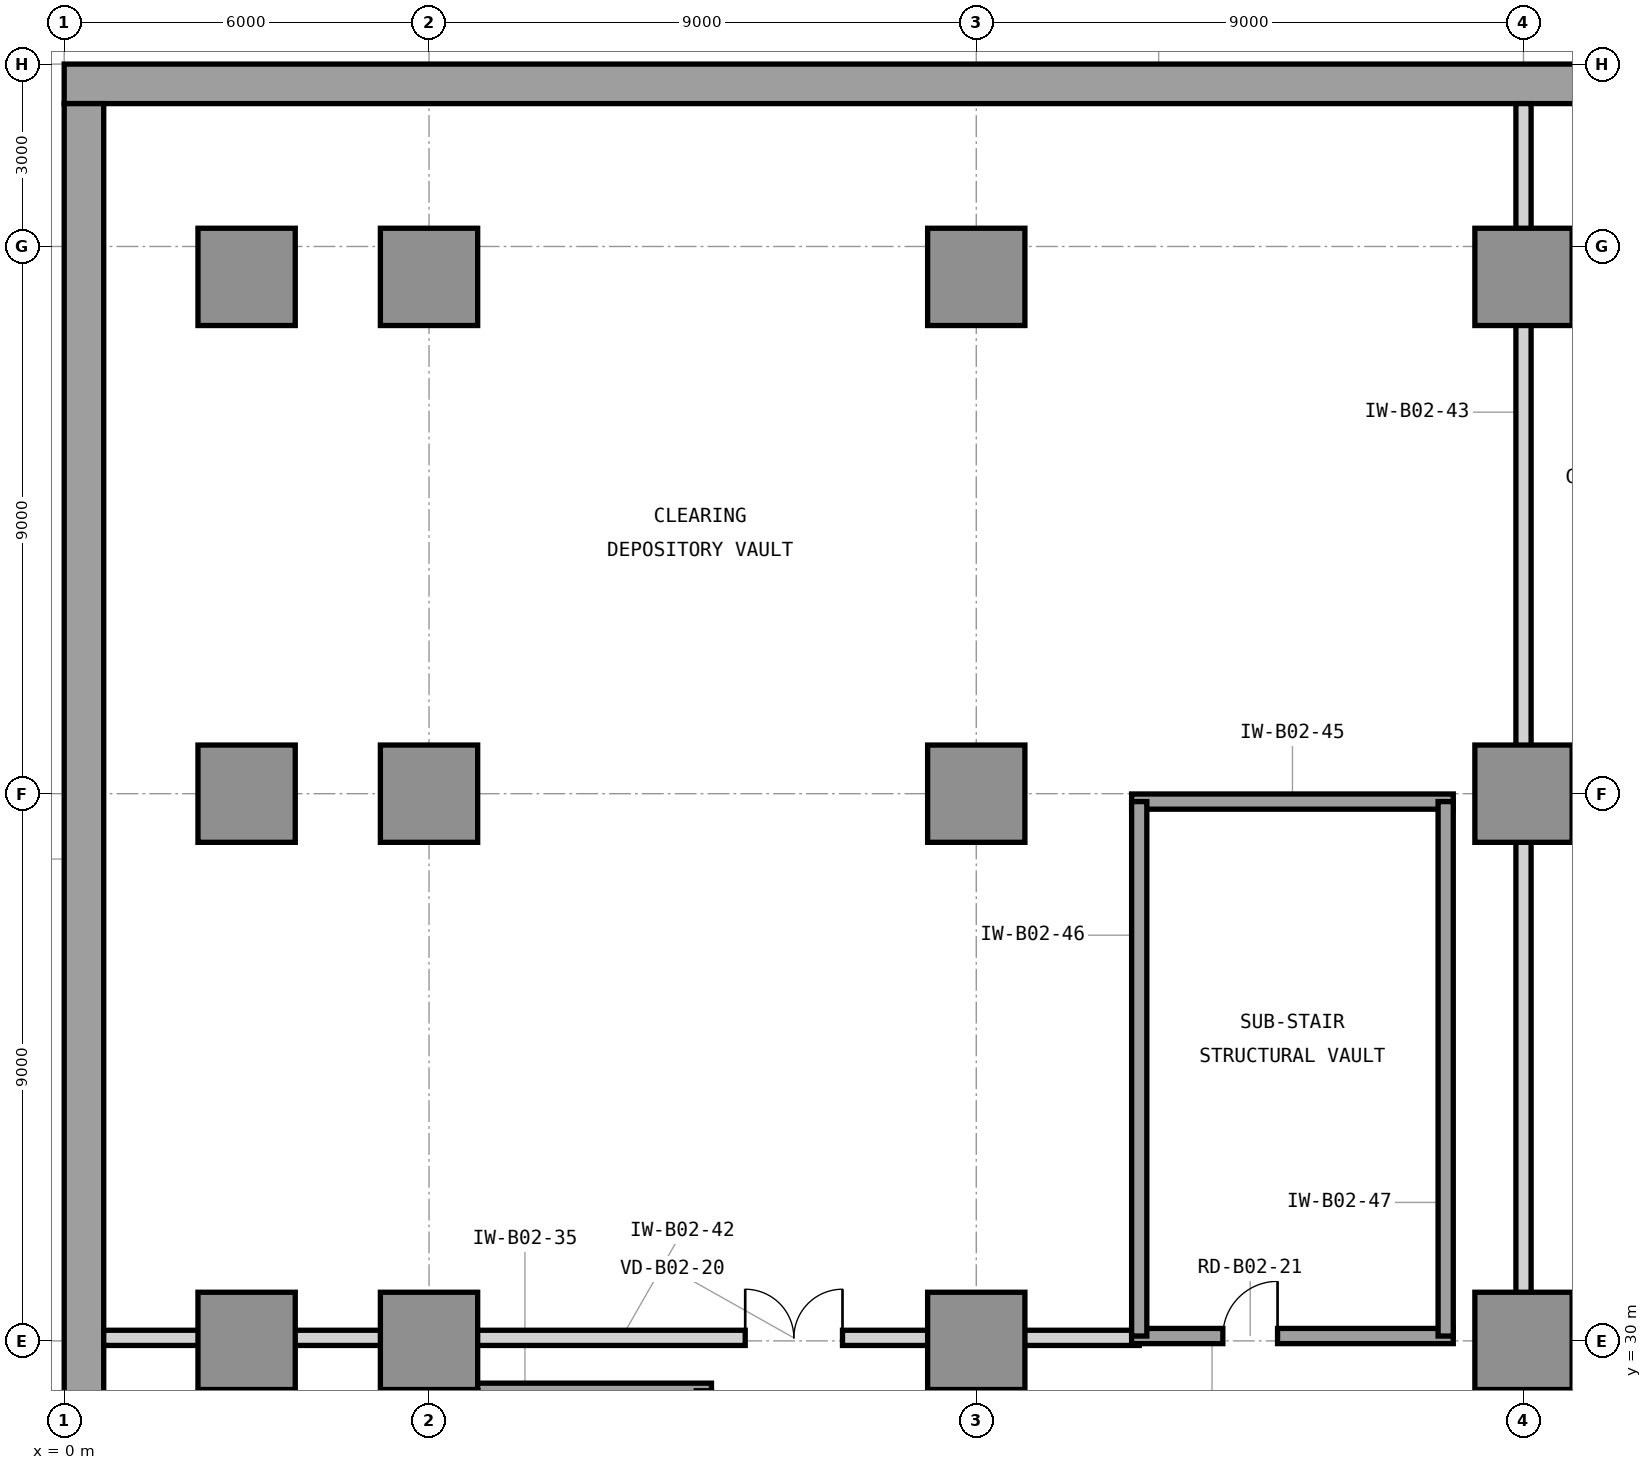
"""IFC4 building model, lengths in metres.
Left out: names, types, materials, properties, quantities, classifications, styles, units other than length and angle.
Written with IfcOpenShell. Run it as: python <this file> out.ifc"""

import sys

from ifc_helpers import new_model, si_unit, direction, frame, frame_2d, origin, origin_2d, place, context, subcontext, project, spatial, rectangle, extrude, element, fill, save


model = new_model("IFC4")
c1 = context("Model", 3, precision=1e-05, world=origin(), true_north=direction((0.0, 1.0)))
c2 = subcontext(c1, "Body", "Model", "MODEL_VIEW")
j1 = project(units=[si_unit("LENGTHUNIT", "METRE"), si_unit("PLANEANGLEUNIT", "RADIAN")], contexts=[c1])
p1 = place(None, origin())
s1 = spatial("IfcSite", under=j1, at=p1, CompositionType="ELEMENT")
p2 = place(p1, origin())
s2 = spatial("IfcBuilding", under=s1, at=p2, CompositionType="ELEMENT")
p3 = place(p2, frame((0.0, 0.0, -9.0)))
s3 = spatial("IfcBuildingStorey", under=s2, at=p3, CompositionType="ELEMENT", Elevation=-9.0)
p4 = place(p3, frame((72.0, 50.675, 0.0), z_axis=(0.0, 0.0, 1.0), x_axis=(-1.0, 0.0, 0.0)))
e1 = element("IfcWall", 1, at=p4, inside=s3, PredefinedType="USERDEFINED", context=c2, shape_type="SweptSolid", body=[
    extrude(rectangle(XDim=72.0, YDim=0.65, at=frame_2d((36.0, 0.0))), origin(), (0.0, 0.0, 1.0), 4.5),
])
p5 = place(p3, frame((0.325, 50.35, 0.0), z_axis=(0.0, 0.0, 1.0), x_axis=(0.0, -1.0, 0.0)))
e2 = element("IfcWall", 2, at=p5, inside=s3, PredefinedType="USERDEFINED", context=c2, shape_type="SweptSolid", body=[
    extrude(rectangle(XDim=49.7, YDim=0.65, at=frame_2d((24.85, 0.0))), origin(), (0.0, 0.0, 1.0), 4.5),
])
for number, where, z_axis, x_axis in (
    (3, (3.0, 30.0, 0.0), (0.0, 0.0, 1.0), (1.0, 0.0, 0.0)),
    (4, (3.0, 39.0, 0.0), (0.0, 0.0, 1.0), (1.0, 0.0, 0.0)),
    (5, (3.0, 47.5, 0.0), (0.0, 0.0, 1.0), (1.0, 0.0, 0.0)),
    (6, (6.0, 30.0, 0.0), (0.0, 0.0, 1.0), (1.0, 0.0, 0.0)),
    (7, (6.0, 39.0, 0.0), (0.0, 0.0, 1.0), (1.0, 0.0, 0.0)),
    (8, (6.0, 47.5, 0.0), (0.0, 0.0, 1.0), (1.0, 0.0, 0.0)),
    (9, (15.0, 30.0, 0.0), (0.0, 0.0, 1.0), (1.0, 0.0, 0.0)),
    (10, (15.0, 39.0, 0.0), (0.0, 0.0, 1.0), (1.0, 0.0, 0.0)),
    (11, (15.0, 47.5, 0.0), (0.0, 0.0, 1.0), (1.0, 0.0, 0.0)),
    (12, (24.0, 30.0, 0.0), (0.0, 0.0, 1.0), (1.0, 0.0, 0.0)),
    (13, (24.0, 39.0, 0.0), (0.0, 0.0, 1.0), (1.0, 0.0, 0.0)),
    (14, (24.0, 47.5, 0.0), (0.0, 0.0, 1.0), (1.0, 0.0, 0.0)),
):
    element("IfcColumn", number, at=place(p3, frame(where, z_axis=z_axis, x_axis=x_axis)), inside=s3, PredefinedType="COLUMN", context=c2, shape_type="SweptSolid", body=[
        extrude(rectangle(XDim=1.6, YDim=1.6, at=origin_2d()), origin(), (0.0, 0.0, 1.0), 4.5),
    ])
p6 = place(p3, frame((6.555, 29.18, 0.0), z_axis=(0.0, 0.0, 1.0), x_axis=(1.0, 0.0, 0.0)))
e15 = element("IfcWall", 15, at=p6, inside=s3, PredefinedType="SHEAR", context=c2, shape_type="SweptSolid", body=[
    extrude(rectangle(XDim=4.09, YDim=0.25, at=frame_2d((2.045, 0.0))), origin(), (0.0, 0.0, 1.0), 4.5),
])
p7 = place(p3, frame((0.65, 30.05, 0.0), z_axis=(0.0, 0.0, 1.0), x_axis=(1.0, 0.0, 0.0)))
e16 = element("IfcWall", 16, at=p7, inside=s3, PredefinedType="PARTITIONING", context=c2, shape_type="SweptSolid", body=[
    extrude(rectangle(XDim=17.03, YDim=0.25, at=frame_2d((8.515, 0.0))), origin(), (0.0, 0.0, 1.0), 3.2),
])
p8 = place(p7, frame((10.55, 0.0, 0.0)))
e17 = element("IfcOpeningElement", 17, at=p8, cuts=e16, PredefinedType="OPENING", context=c2, shape_type="SweptSolid", body=[
    extrude(rectangle(XDim=1.6, YDim=2.3, at=frame_2d((0.8, 1.15))), frame((0.0, 0.135, 0.0), z_axis=(0.0, -1.0, 0.0), x_axis=(1.0, 0.0, 0.0)), (0.0, 0.0, 1.0), 0.27),
])
p9 = place(p3, frame((24.0, 30.05, 0.0), z_axis=(0.0, 0.0, 1.0), x_axis=(0.0, 1.0, 0.0)))
e18 = element("IfcWall", 18, at=p9, inside=s3, PredefinedType="PARTITIONING", context=c2, shape_type="SweptSolid", body=[
    extrude(rectangle(XDim=20.3, YDim=0.25, at=frame_2d((10.15, 0.0))), origin(), (0.0, 0.0, 1.0), 3.2),
])
p10 = place(p3, frame((17.555, 30.08, 0.0), z_axis=(0.0, 0.0, 1.0), x_axis=(1.0, 0.0, 0.0)))
e19 = element("IfcWall", 19, at=p10, inside=s3, PredefinedType="SHEAR", context=c2, shape_type="SweptSolid", body=[
    extrude(rectangle(XDim=5.29, YDim=0.25, at=frame_2d((2.645, 0.0))), origin(), (0.0, 0.0, 1.0), 4.5),
])
p11 = place(p10, frame((1.5, 0.0, 0.0)))
e20 = element("IfcOpeningElement", 20, at=p11, cuts=e19, PredefinedType="OPENING", context=c2, shape_type="SweptSolid", body=[
    extrude(rectangle(XDim=0.9, YDim=2.1, at=frame_2d((0.45, 1.05))), frame((0.0, 0.135, 0.0), z_axis=(0.0, -1.0, 0.0), x_axis=(1.0, 0.0, 0.0)), (0.0, 0.0, 1.0), 0.27),
])
p12 = place(p3, frame((17.555, 38.87, 0.0), z_axis=(0.0, 0.0, 1.0), x_axis=(1.0, 0.0, 0.0)))
e21 = element("IfcWall", 21, at=p12, inside=s3, PredefinedType="SHEAR", context=c2, shape_type="SweptSolid", body=[
    extrude(rectangle(XDim=5.29, YDim=0.25, at=frame_2d((2.645, 0.0))), origin(), (0.0, 0.0, 1.0), 4.5),
])
for number, where, z_axis, x_axis in (
    (22, (17.68, 30.08, 0.0), (0.0, 0.0, 1.0), (0.0, 1.0, 0.0)),
    (23, (22.72, 30.08, 0.0), (0.0, 0.0, 1.0), (0.0, 1.0, 0.0)),
):
    element("IfcWall", number, at=place(p3, frame(where, z_axis=z_axis, x_axis=x_axis)), inside=s3, PredefinedType="SHEAR", context=c2, shape_type="SweptSolid", body=[
        extrude(rectangle(XDim=8.79, YDim=0.25, at=frame_2d((4.395, 0.0))), origin(), (0.0, 0.0, 1.0), 4.5),
    ])
p13 = place(p8, origin())
e24 = element("IfcDoor", 24, at=p13, inside=s3, OperationType="DOUBLE_DOOR_SINGLE_SWING", PredefinedType="DOOR", context=c2, shape_type="SweptSolid", body=[
    extrude(rectangle(XDim=1.6, YDim=2.3, at=frame_2d((0.8, 1.15))), frame((0.0, 0.025, 0.0), z_axis=(0.0, -1.0, 0.0), x_axis=(1.0, 0.0, 0.0)), (0.0, 0.0, 1.0), 0.05),
])
fill(e17, e24)
p14 = place(p11, origin())
e25 = element("IfcDoor", 25, at=p14, inside=s3, OperationType="SINGLE_SWING_RIGHT", PredefinedType="TRAPDOOR", context=c2, shape_type="SweptSolid", body=[
    extrude(rectangle(XDim=0.9, YDim=2.1, at=frame_2d((0.45, 1.05))), frame((0.0, 0.025, 0.0), z_axis=(0.0, -1.0, 0.0), x_axis=(1.0, 0.0, 0.0)), (0.0, 0.0, 1.0), 0.05),
])
fill(e20, e25)
save(model, sys.argv[1])
